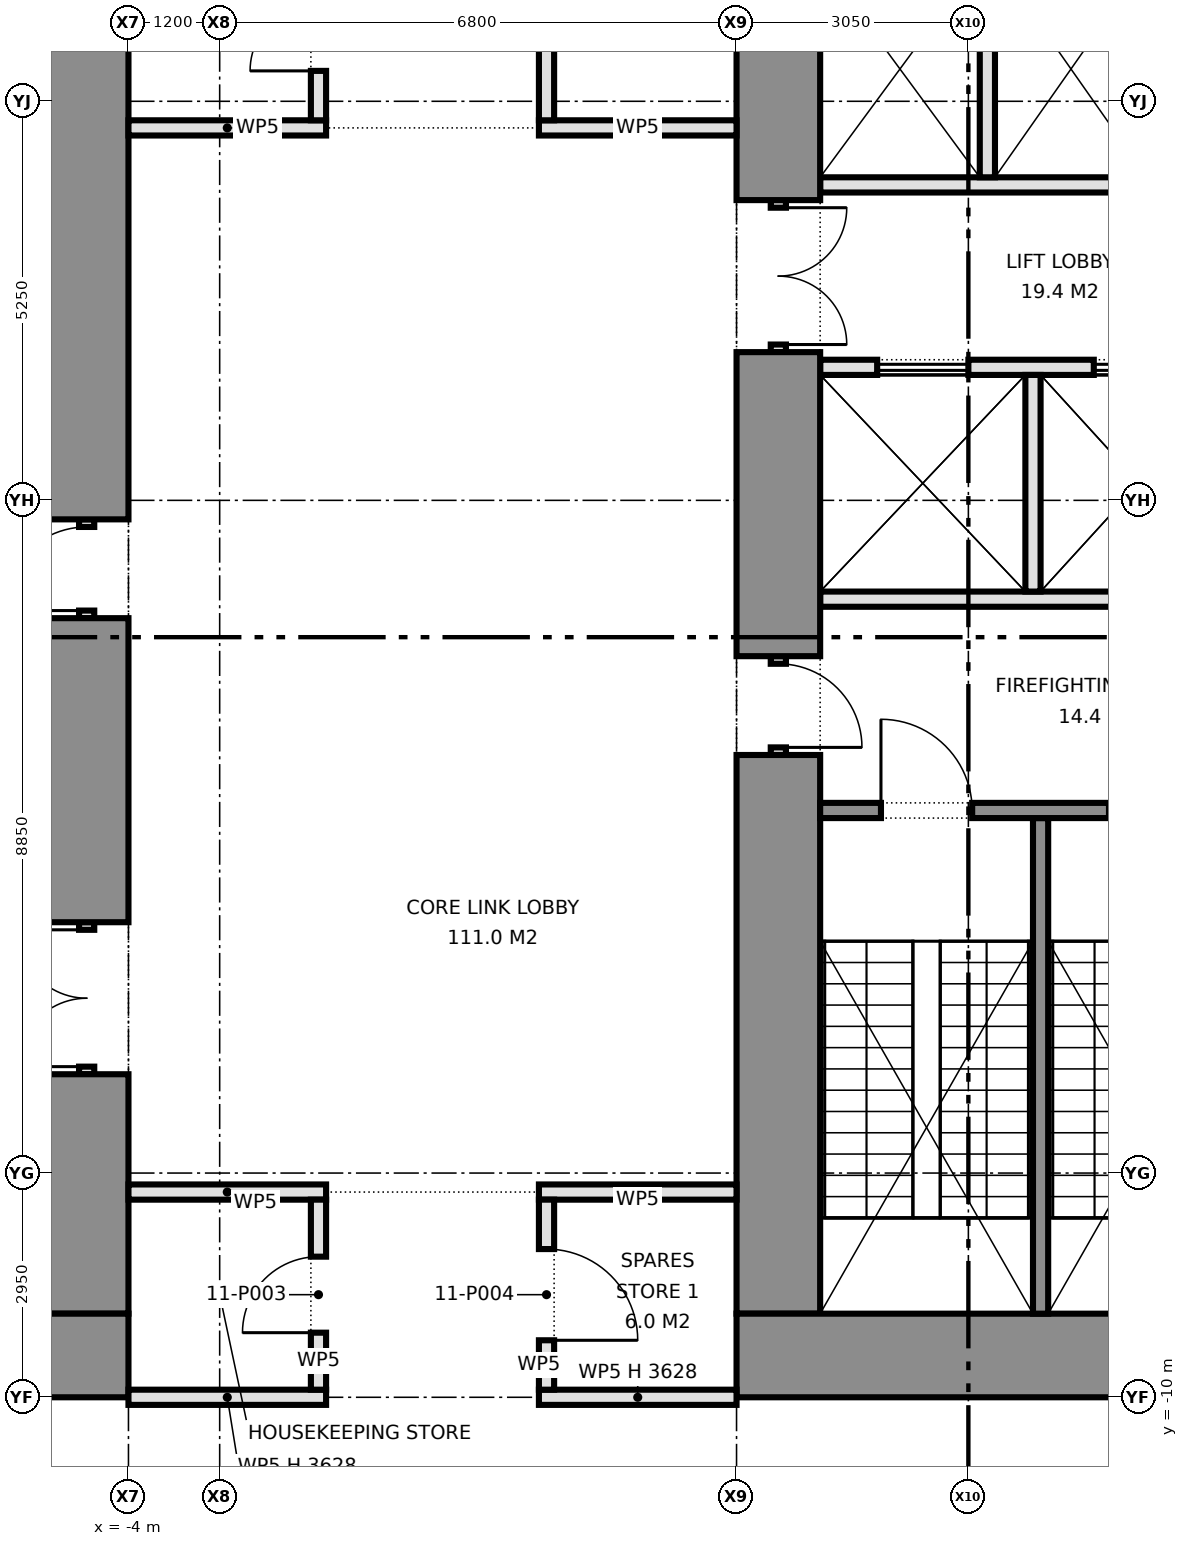
"""IFC4 building model, lengths in metres.
Left out: names, types, materials, properties, quantities, classifications, styles, units other than length and angle.
Written with IfcOpenShell. Run it as: python <this file> out.ifc"""

import sys

from ifc_helpers import new_model, si_unit, direction, frame, frame_2d, origin, place, context, subcontext, project, spatial, rectangle, extrude, element, fill, save


model = new_model("IFC4")
c1 = context("Model", 3, precision=1e-05, world=origin(), true_north=direction((0.0, 1.0)))
c2 = subcontext(c1, "Body", "Model", "MODEL_VIEW")
j1 = project(units=[si_unit("LENGTHUNIT", "METRE"), si_unit("PLANEANGLEUNIT", "RADIAN")], contexts=[c1])
p1 = place(None, origin())
s1 = spatial("IfcSite", under=j1, at=p1, CompositionType="ELEMENT")
p2 = place(p1, origin())
s2 = spatial("IfcBuilding", under=s1, at=p2, CompositionType="ELEMENT")
p3 = place(p2, frame((0.0, 0.0, 49.7)))
s3 = spatial("IfcBuildingStorey", under=s2, at=p3, CompositionType="ELEMENT", Elevation=49.7)
p4 = place(p3, frame((-15.0, -9.45, 0.0), z_axis=(0.0, 0.0, 1.0), x_axis=(1.0, 0.0, 0.0)))
e1 = element("IfcWall", 1, at=p4, inside=s3, PredefinedType="SHEAR", context=c2, shape_type="SweptSolid", body=[
    extrude(rectangle(XDim=11.0, YDim=1.1, at=frame_2d((5.5, 0.0))), origin(), (0.0, 0.0, 1.0), 4.575),
])
p5 = place(p3, frame((-4.55, -8.9, 0.0), z_axis=(0.0, 0.0, 1.0), x_axis=(0.0, 1.0, 0.0)))
e2 = element("IfcWall", 2, at=p5, inside=s3, PredefinedType="SHEAR", context=c2, shape_type="SweptSolid", body=[
    extrude(rectangle(XDim=3.15, YDim=1.1, at=frame_2d((1.575, 0.0))), origin(), (0.0, 0.0, 1.0), 4.575),
])
p6 = place(p3, frame((-4.55, -5.75, 0.0), z_axis=(0.0, 0.0, 1.0), x_axis=(0.0, 1.0, 0.0)))
e3 = element("IfcWall", 3, at=p6, inside=s3, PredefinedType="PARTITIONING", context=c2, shape_type="SweptSolid", body=[
    extrude(rectangle(XDim=2.0, YDim=0.2, at=frame_2d((1.0, 0.0))), origin(), (0.0, 0.0, 1.0), 2.4),
])
p7 = place(p6, frame((0.1, 0.0, 0.0)))
e4 = element("IfcOpeningElement", 4, at=p7, cuts=e3, PredefinedType="OPENING", context=c2, shape_type="SweptSolid", body=[
    extrude(rectangle(XDim=1.8, YDim=2.1, at=frame_2d((0.9, 1.05))), frame((0.0, 0.11, 0.0), z_axis=(0.0, -1.0, 0.0), x_axis=(1.0, 0.0, 0.0)), (0.0, 0.0, 1.0), 0.22),
])
p8 = place(p3, frame((-4.55, -3.75, 0.0), z_axis=(0.0, 0.0, 1.0), x_axis=(0.0, 1.0, 0.0)))
e5 = element("IfcWall", 5, at=p8, inside=s3, PredefinedType="SHEAR", context=c2, shape_type="SweptSolid", body=[
    extrude(rectangle(XDim=4.0, YDim=1.1, at=frame_2d((2.0, 0.0))), origin(), (0.0, 0.0, 1.0), 4.575),
])
p9 = place(p3, frame((-4.55, 0.25, 0.0), z_axis=(0.0, 0.0, 1.0), x_axis=(0.0, 1.0, 0.0)))
e6 = element("IfcWall", 6, at=p9, inside=s3, PredefinedType="PARTITIONING", context=c2, shape_type="SweptSolid", body=[
    extrude(rectangle(XDim=1.3, YDim=0.2, at=frame_2d((0.65, 0.0))), origin(), (0.0, 0.0, 1.0), 2.4),
])
p10 = place(p9, frame((0.1, 0.0, 0.0)))
e7 = element("IfcOpeningElement", 7, at=p10, cuts=e6, PredefinedType="OPENING", context=c2, shape_type="SweptSolid", body=[
    extrude(rectangle(XDim=1.1, YDim=2.1, at=frame_2d((0.55, 1.05))), frame((0.0, 0.11, 0.0), z_axis=(0.0, -1.0, 0.0), x_axis=(1.0, 0.0, 0.0)), (0.0, 0.0, 1.0), 0.22),
])
p11 = place(p3, frame((-4.55, 1.55, 0.0), z_axis=(0.0, 0.0, 1.0), x_axis=(0.0, 1.0, 0.0)))
e8 = element("IfcWall", 8, at=p11, inside=s3, PredefinedType="SHEAR", context=c2, shape_type="SweptSolid", body=[
    extrude(rectangle(XDim=7.35, YDim=1.1, at=frame_2d((3.675, 0.0))), origin(), (0.0, 0.0, 1.0), 4.575),
])
p12 = place(p3, frame((15.0, -9.45, 0.0), z_axis=(0.0, 0.0, 1.0), x_axis=(-1.0, 0.0, 0.0)))
e9 = element("IfcWall", 9, at=p12, inside=s3, PredefinedType="SHEAR", context=c2, shape_type="SweptSolid", body=[
    extrude(rectangle(XDim=11.0, YDim=1.1, at=frame_2d((5.5, 0.0))), origin(), (0.0, 0.0, 1.0), 4.575),
])
p13 = place(p3, frame((4.55, 8.9, 0.0), z_axis=(0.0, 0.0, 1.0), x_axis=(0.0, -1.0, 0.0)))
e10 = element("IfcWall", 10, at=p13, inside=s3, PredefinedType="SHEAR", context=c2, shape_type="SweptSolid", body=[
    extrude(rectangle(XDim=3.15, YDim=1.1, at=frame_2d((1.575, 0.0))), origin(), (0.0, 0.0, 1.0), 4.575),
])
p14 = place(p3, frame((4.55, 5.75, 0.0), z_axis=(0.0, 0.0, 1.0), x_axis=(0.0, -1.0, 0.0)))
e11 = element("IfcWall", 11, at=p14, inside=s3, PredefinedType="PARTITIONING", context=c2, shape_type="SweptSolid", body=[
    extrude(rectangle(XDim=2.0, YDim=0.2, at=frame_2d((1.0, 0.0))), origin(), (0.0, 0.0, 1.0), 2.4),
])
p15 = place(p14, frame((0.1, 0.0, 0.0)))
e12 = element("IfcOpeningElement", 12, at=p15, cuts=e11, PredefinedType="OPENING", context=c2, shape_type="SweptSolid", body=[
    extrude(rectangle(XDim=1.8, YDim=2.1, at=frame_2d((0.9, 1.05))), frame((0.0, 0.11, 0.0), z_axis=(0.0, -1.0, 0.0), x_axis=(1.0, 0.0, 0.0)), (0.0, 0.0, 1.0), 0.22),
])
p16 = place(p3, frame((4.55, 3.75, 0.0), z_axis=(0.0, 0.0, 1.0), x_axis=(0.0, -1.0, 0.0)))
e13 = element("IfcWall", 13, at=p16, inside=s3, PredefinedType="SHEAR", context=c2, shape_type="SweptSolid", body=[
    extrude(rectangle(XDim=4.0, YDim=1.1, at=frame_2d((2.0, 0.0))), origin(), (0.0, 0.0, 1.0), 4.575),
])
p17 = place(p3, frame((4.55, -0.25, 0.0), z_axis=(0.0, 0.0, 1.0), x_axis=(0.0, -1.0, 0.0)))
e14 = element("IfcWall", 14, at=p17, inside=s3, PredefinedType="PARTITIONING", context=c2, shape_type="SweptSolid", body=[
    extrude(rectangle(XDim=1.3, YDim=0.2, at=frame_2d((0.65, 0.0))), origin(), (0.0, 0.0, 1.0), 2.4),
])
p18 = place(p17, frame((0.1, 0.0, 0.0)))
e15 = element("IfcOpeningElement", 15, at=p18, cuts=e14, PredefinedType="OPENING", context=c2, shape_type="SweptSolid", body=[
    extrude(rectangle(XDim=1.1, YDim=2.1, at=frame_2d((0.55, 1.05))), frame((0.0, 0.11, 0.0), z_axis=(0.0, -1.0, 0.0), x_axis=(1.0, 0.0, 0.0)), (0.0, 0.0, 1.0), 0.22),
])
p19 = place(p3, frame((4.55, -1.55, 0.0), z_axis=(0.0, 0.0, 1.0), x_axis=(0.0, -1.0, 0.0)))
e16 = element("IfcWall", 16, at=p19, inside=s3, PredefinedType="SHEAR", context=c2, shape_type="SweptSolid", body=[
    extrude(rectangle(XDim=7.35, YDim=1.1, at=frame_2d((3.675, 0.0))), origin(), (0.0, 0.0, 1.0), 4.575),
])
p20 = place(p3, frame((13.9, 5.95, 0.0), z_axis=(0.0, 0.0, 1.0), x_axis=(-1.0, 0.0, 0.0)))
e17 = element("IfcWall", 17, at=p20, inside=s3, PredefinedType="PARTITIONING", context=c2, shape_type="SweptSolid", body=[
    extrude(rectangle(XDim=8.8, YDim=0.2, at=frame_2d((4.4, 0.0))), origin(), (0.0, 0.0, 1.0), 4.575),
])
p21 = place(p20, frame((1.7, 0.0, 0.0)))
e18 = element("IfcOpeningElement", 18, at=p21, cuts=e17, PredefinedType="OPENING", context=c2, shape_type="SweptSolid", body=[
    extrude(rectangle(XDim=0.9, YDim=2.1, at=frame_2d((0.45, 1.05))), frame((0.0, 0.11, 0.0), z_axis=(0.0, -1.0, 0.0), x_axis=(1.0, 0.0, 0.0)), (0.0, 0.0, 1.0), 0.22),
])
p22 = place(p3, frame((13.9, 3.55, 0.0), z_axis=(0.0, 0.0, 1.0), x_axis=(-1.0, 0.0, 0.0)))
e19 = element("IfcWall", 19, at=p22, inside=s3, PredefinedType="PARTITIONING", context=c2, shape_type="SweptSolid", body=[
    extrude(rectangle(XDim=8.8, YDim=0.2, at=frame_2d((4.4, 0.0))), origin(), (0.0, 0.0, 1.0), 4.575),
])
p23 = place(p22, frame((0.65, 0.0, 0.0)))
e20 = element("IfcOpeningElement", 20, at=p23, cuts=e19, PredefinedType="OPENING", context=c2, shape_type="SweptSolid", body=[
    extrude(rectangle(XDim=1.8, YDim=2.1, at=frame_2d((0.9, 1.05))), frame((0.0, 0.11, 0.0), z_axis=(0.0, -1.0, 0.0), x_axis=(1.0, 0.0, 0.0)), (0.0, 0.0, 1.0), 0.22),
])
p24 = place(p22, frame((4.0, 0.0, 0.0)))
e21 = element("IfcOpeningElement", 21, at=p24, cuts=e19, PredefinedType="OPENING", context=c2, shape_type="SweptSolid", body=[
    extrude(rectangle(XDim=1.2, YDim=2.1, at=frame_2d((0.6, 1.05))), frame((0.0, 0.11, 0.0), z_axis=(0.0, -1.0, 0.0), x_axis=(1.0, 0.0, 0.0)), (0.0, 0.0, 1.0), 0.22),
])
p25 = place(p22, frame((6.85, 0.0, 0.0)))
e22 = element("IfcOpeningElement", 22, at=p25, cuts=e19, PredefinedType="OPENING", context=c2, shape_type="SweptSolid", body=[
    extrude(rectangle(XDim=1.2, YDim=2.1, at=frame_2d((0.6, 1.05))), frame((0.0, 0.11, 0.0), z_axis=(0.0, -1.0, 0.0), x_axis=(1.0, 0.0, 0.0)), (0.0, 0.0, 1.0), 0.22),
])
p26 = place(p3, frame((13.9, 0.5, 0.0), z_axis=(0.0, 0.0, 1.0), x_axis=(-1.0, 0.0, 0.0)))
e23 = element("IfcWall", 23, at=p26, inside=s3, PredefinedType="PARTITIONING", context=c2, shape_type="SweptSolid", body=[
    extrude(rectangle(XDim=8.8, YDim=0.2, at=frame_2d((4.4, 0.0))), origin(), (0.0, 0.0, 1.0), 4.575),
])
p27 = place(p3, frame((13.9, -2.28, 0.0), z_axis=(0.0, 0.0, 1.0), x_axis=(-1.0, 0.0, 0.0)))
e24 = element("IfcWall", 24, at=p27, inside=s3, PredefinedType="SHEAR", context=c2, shape_type="SweptSolid", body=[
    extrude(rectangle(XDim=8.8, YDim=0.2, at=frame_2d((4.4, 0.0))), origin(), (0.0, 0.0, 1.0), 4.575),
])
p28 = place(p27, frame((3.8, 0.0, 0.0)))
e25 = element("IfcOpeningElement", 25, at=p28, cuts=e24, PredefinedType="OPENING", context=c2, shape_type="SweptSolid", body=[
    extrude(rectangle(XDim=1.2, YDim=2.1, at=frame_2d((0.6, 1.05))), frame((0.0, 0.11, 0.0), z_axis=(0.0, -1.0, 0.0), x_axis=(1.0, 0.0, 0.0)), (0.0, 0.0, 1.0), 0.22),
])
p29 = place(p27, frame((6.8, 0.0, 0.0)))
e26 = element("IfcOpeningElement", 26, at=p29, cuts=e24, PredefinedType="OPENING", context=c2, shape_type="SweptSolid", body=[
    extrude(rectangle(XDim=1.2, YDim=2.1, at=frame_2d((0.6, 1.05))), frame((0.0, 0.11, 0.0), z_axis=(0.0, -1.0, 0.0), x_axis=(1.0, 0.0, 0.0)), (0.0, 0.0, 1.0), 0.22),
])
p30 = place(p3, frame((8.0, -2.38, 0.0), z_axis=(0.0, 0.0, 1.0), x_axis=(0.0, -1.0, 0.0)))
e27 = element("IfcWall", 27, at=p30, inside=s3, PredefinedType="SHEAR", context=c2, shape_type="SweptSolid", body=[
    extrude(rectangle(XDim=6.52, YDim=0.2, at=frame_2d((3.26, 0.0))), origin(), (0.0, 0.0, 1.0), 4.575),
])
for number, where, z_axis, x_axis in (
    (28, (7.3, 8.9, 0.0), (0.0, 0.0, 1.0), (0.0, -1.0, 0.0)),
    (29, (7.9, 3.45, 0.0), (0.0, 0.0, 1.0), (0.0, -1.0, 0.0)),
):
    element("IfcWall", number, at=place(p3, frame(where, z_axis=z_axis, x_axis=x_axis)), inside=s3, PredefinedType="PARTITIONING", context=c2, shape_type="SweptSolid", body=[
        extrude(rectangle(XDim=2.85, YDim=0.2, at=frame_2d((1.425, 0.0))), origin(), (0.0, 0.0, 1.0), 4.575),
    ])
for number, where, z_axis, x_axis in (
    (30, (-4.0, -10.0, 0.0), (0.0, 0.0, 1.0), (1.0, 0.0, 0.0)),
    (31, (1.4, -10.0, 0.0), (0.0, 0.0, 1.0), (1.0, 0.0, 0.0)),
):
    element("IfcWall", number, at=place(p3, frame(where, z_axis=z_axis, x_axis=x_axis)), inside=s3, PredefinedType="PARTITIONING", context=c2, shape_type="SweptSolid", body=[
        extrude(rectangle(XDim=2.6, YDim=0.2, at=frame_2d((1.3, 0.0))), origin(), (0.0, 0.0, 1.0), 3.628),
    ])
for number, where, z_axis, x_axis in (
    (32, (-4.0, -7.3, 0.0), (0.0, 0.0, 1.0), (1.0, 0.0, 0.0)),
    (33, (1.4, -7.3, 0.0), (0.0, 0.0, 1.0), (1.0, 0.0, 0.0)),
    (34, (-4.0, 6.7, 0.0), (0.0, 0.0, 1.0), (1.0, 0.0, 0.0)),
    (35, (1.4, 6.7, 0.0), (0.0, 0.0, 1.0), (1.0, 0.0, 0.0)),
):
    element("IfcWall", number, at=place(p3, frame(where, z_axis=z_axis, x_axis=x_axis)), inside=s3, PredefinedType="PARTITIONING", context=c2, shape_type="SweptSolid", body=[
        extrude(rectangle(XDim=2.6, YDim=0.2, at=frame_2d((1.3, 0.0))), origin(), (0.0, 0.0, 1.0), 4.575),
    ])
p31 = place(p3, frame((1.5, -9.9, 0.0), z_axis=(0.0, 0.0, 1.0), x_axis=(0.0, 1.0, 0.0)))
e36 = element("IfcWall", 36, at=p31, inside=s3, PredefinedType="PARTITIONING", context=c2, shape_type="SweptSolid", body=[
    extrude(rectangle(XDim=2.5, YDim=0.2, at=frame_2d((1.25, 0.0))), origin(), (0.0, 0.0, 1.0), 4.575),
])
p32 = place(p31, frame((0.65, 0.0, 0.0)))
e37 = element("IfcOpeningElement", 37, at=p32, cuts=e36, PredefinedType="OPENING", context=c2, shape_type="SweptSolid", body=[
    extrude(rectangle(XDim=1.2, YDim=2.1, at=frame_2d((0.6, 1.05))), frame((0.0, 0.11, 0.0), z_axis=(0.0, -1.0, 0.0), x_axis=(1.0, 0.0, 0.0)), (0.0, 0.0, 1.0), 0.22),
])
p33 = place(p3, frame((1.5, 6.8, 0.0), z_axis=(0.0, 0.0, 1.0), x_axis=(0.0, 1.0, 0.0)))
e38 = element("IfcWall", 38, at=p33, inside=s3, PredefinedType="PARTITIONING", context=c2, shape_type="SweptSolid", body=[
    extrude(rectangle(XDim=3.1, YDim=0.2, at=frame_2d((1.55, 0.0))), origin(), (0.0, 0.0, 1.0), 4.575),
])
p34 = place(p33, frame((1.05, 0.0, 0.0)))
e39 = element("IfcOpeningElement", 39, at=p34, cuts=e38, PredefinedType="OPENING", context=c2, shape_type="SweptSolid", body=[
    extrude(rectangle(XDim=1.0, YDim=2.1, at=frame_2d((0.5, 1.05))), frame((0.0, 0.11, 0.0), z_axis=(0.0, -1.0, 0.0), x_axis=(1.0, 0.0, 0.0)), (0.0, 0.0, 1.0), 0.22),
])
p35 = place(p3, frame((-1.5, -9.9, 0.0), z_axis=(0.0, 0.0, 1.0), x_axis=(0.0, 1.0, 0.0)))
e40 = element("IfcWall", 40, at=p35, inside=s3, PredefinedType="PARTITIONING", context=c2, shape_type="SweptSolid", body=[
    extrude(rectangle(XDim=2.5, YDim=0.2, at=frame_2d((1.25, 0.0))), origin(), (0.0, 0.0, 1.0), 4.575),
])
p36 = place(p35, frame((0.75, 0.0, 0.0)))
e41 = element("IfcOpeningElement", 41, at=p36, cuts=e40, PredefinedType="OPENING", context=c2, shape_type="SweptSolid", body=[
    extrude(rectangle(XDim=1.0, YDim=2.1, at=frame_2d((0.5, 1.05))), frame((0.0, 0.11, 0.0), z_axis=(0.0, -1.0, 0.0), x_axis=(1.0, 0.0, 0.0)), (0.0, 0.0, 1.0), 0.22),
])
p37 = place(p3, frame((-1.5, 6.8, 0.0), z_axis=(0.0, 0.0, 1.0), x_axis=(0.0, 1.0, 0.0)))
e42 = element("IfcWall", 42, at=p37, inside=s3, PredefinedType="PARTITIONING", context=c2, shape_type="SweptSolid", body=[
    extrude(rectangle(XDim=3.1, YDim=0.2, at=frame_2d((1.55, 0.0))), origin(), (0.0, 0.0, 1.0), 4.575),
])
p38 = place(p37, frame((0.65, 0.0, 0.0)))
e43 = element("IfcOpeningElement", 43, at=p38, cuts=e42, PredefinedType="OPENING", context=c2, shape_type="SweptSolid", body=[
    extrude(rectangle(XDim=1.8, YDim=2.1, at=frame_2d((0.9, 1.05))), frame((0.0, 0.11, 0.0), z_axis=(0.0, -1.0, 0.0), x_axis=(1.0, 0.0, 0.0)), (0.0, 0.0, 1.0), 0.22),
])
p39 = place(p7, origin())
e44 = element("IfcDoor", 44, at=p39, inside=s3, OperationType="DOUBLE_DOOR_SINGLE_SWING", PredefinedType="DOOR", context=c2, shape_type="SweptSolid", body=[
    extrude(rectangle(XDim=1.8, YDim=2.1, at=frame_2d((0.9, 1.05))), frame((0.0, 0.025, 0.0), z_axis=(0.0, -1.0, 0.0), x_axis=(1.0, 0.0, 0.0)), (0.0, 0.0, 1.0), 0.05),
])
fill(e4, e44)
p40 = place(p10, origin())
e45 = element("IfcDoor", 45, at=p40, inside=s3, OperationType="SINGLE_SWING_LEFT", PredefinedType="DOOR", context=c2, shape_type="SweptSolid", body=[
    extrude(rectangle(XDim=1.1, YDim=2.1, at=frame_2d((0.55, 1.05))), frame((0.0, 0.025, 0.0), z_axis=(0.0, -1.0, 0.0), x_axis=(1.0, 0.0, 0.0)), (0.0, 0.0, 1.0), 0.05),
])
fill(e7, e45)
p41 = place(p15, origin())
e46 = element("IfcDoor", 46, at=p41, inside=s3, OperationType="DOUBLE_DOOR_SINGLE_SWING", PredefinedType="DOOR", context=c2, shape_type="SweptSolid", body=[
    extrude(rectangle(XDim=1.8, YDim=2.1, at=frame_2d((0.9, 1.05))), frame((0.0, 0.025, 0.0), z_axis=(0.0, -1.0, 0.0), x_axis=(1.0, 0.0, 0.0)), (0.0, 0.0, 1.0), 0.05),
])
fill(e12, e46)
p42 = place(p18, origin())
e47 = element("IfcDoor", 47, at=p42, inside=s3, OperationType="SINGLE_SWING_RIGHT", PredefinedType="DOOR", context=c2, shape_type="SweptSolid", body=[
    extrude(rectangle(XDim=1.1, YDim=2.1, at=frame_2d((0.55, 1.05))), frame((0.0, 0.025, 0.0), z_axis=(0.0, -1.0, 0.0), x_axis=(1.0, 0.0, 0.0)), (0.0, 0.0, 1.0), 0.05),
])
fill(e15, e47)
p43 = place(p24, origin())
e48 = element("IfcDoor", 48, at=p43, inside=s3, OperationType="DOUBLE_DOOR_SLIDING", PredefinedType="DOOR", context=c2, shape_type="SweptSolid", body=[
    extrude(rectangle(XDim=1.2, YDim=2.1, at=frame_2d((0.6, 1.05))), frame((0.0, 0.025, 0.0), z_axis=(0.0, -1.0, 0.0), x_axis=(1.0, 0.0, 0.0)), (0.0, 0.0, 1.0), 0.05),
])
fill(e21, e48)
p44 = place(p25, origin())
e49 = element("IfcDoor", 49, at=p44, inside=s3, OperationType="DOUBLE_DOOR_SLIDING", PredefinedType="DOOR", context=c2, shape_type="SweptSolid", body=[
    extrude(rectangle(XDim=1.2, YDim=2.1, at=frame_2d((0.6, 1.05))), frame((0.0, 0.025, 0.0), z_axis=(0.0, -1.0, 0.0), x_axis=(1.0, 0.0, 0.0)), (0.0, 0.0, 1.0), 0.05),
])
fill(e22, e49)
p45 = place(p29, frame((1.2, 0.0, 0.0), z_axis=(0.0, 0.0, 1.0), x_axis=(-1.0, 0.0, 0.0)))
e50 = element("IfcDoor", 50, at=p45, inside=s3, OperationType="SINGLE_SWING_LEFT", PredefinedType="DOOR", context=c2, shape_type="SweptSolid", body=[
    extrude(rectangle(XDim=1.2, YDim=2.1, at=frame_2d((0.6, 1.05))), frame((0.0, 0.025, 0.0), z_axis=(0.0, -1.0, 0.0), x_axis=(1.0, 0.0, 0.0)), (0.0, 0.0, 1.0), 0.05),
])
fill(e26, e50)
p46 = place(p38, origin())
e51 = element("IfcDoor", 51, at=p46, inside=s3, OperationType="DOUBLE_DOOR_SINGLE_SWING", PredefinedType="DOOR", context=c2, shape_type="SweptSolid", body=[
    extrude(rectangle(XDim=1.8, YDim=2.1, at=frame_2d((0.9, 1.05))), frame((0.0, 0.025, 0.0), z_axis=(0.0, -1.0, 0.0), x_axis=(1.0, 0.0, 0.0)), (0.0, 0.0, 1.0), 0.05),
])
fill(e43, e51)
p47 = place(p36, origin())
e52 = element("IfcDoor", 52, at=p47, inside=s3, OperationType="SINGLE_SWING_LEFT", PredefinedType="DOOR", context=c2, shape_type="SweptSolid", body=[
    extrude(rectangle(XDim=1.0, YDim=2.1, at=frame_2d((0.5, 1.05))), frame((0.0, 0.025, 0.0), z_axis=(0.0, -1.0, 0.0), x_axis=(1.0, 0.0, 0.0)), (0.0, 0.0, 1.0), 0.05),
])
fill(e41, e52)
p48 = place(p32, frame((1.2, 0.0, 0.0), z_axis=(0.0, 0.0, 1.0), x_axis=(-1.0, 0.0, 0.0)))
e53 = element("IfcDoor", 53, at=p48, inside=s3, OperationType="SINGLE_SWING_RIGHT", PredefinedType="DOOR", context=c2, shape_type="SweptSolid", body=[
    extrude(rectangle(XDim=1.2, YDim=2.1, at=frame_2d((0.6, 1.05))), frame((0.0, 0.025, 0.0), z_axis=(0.0, -1.0, 0.0), x_axis=(1.0, 0.0, 0.0)), (0.0, 0.0, 1.0), 0.05),
])
fill(e37, e53)
save(model, sys.argv[1])
